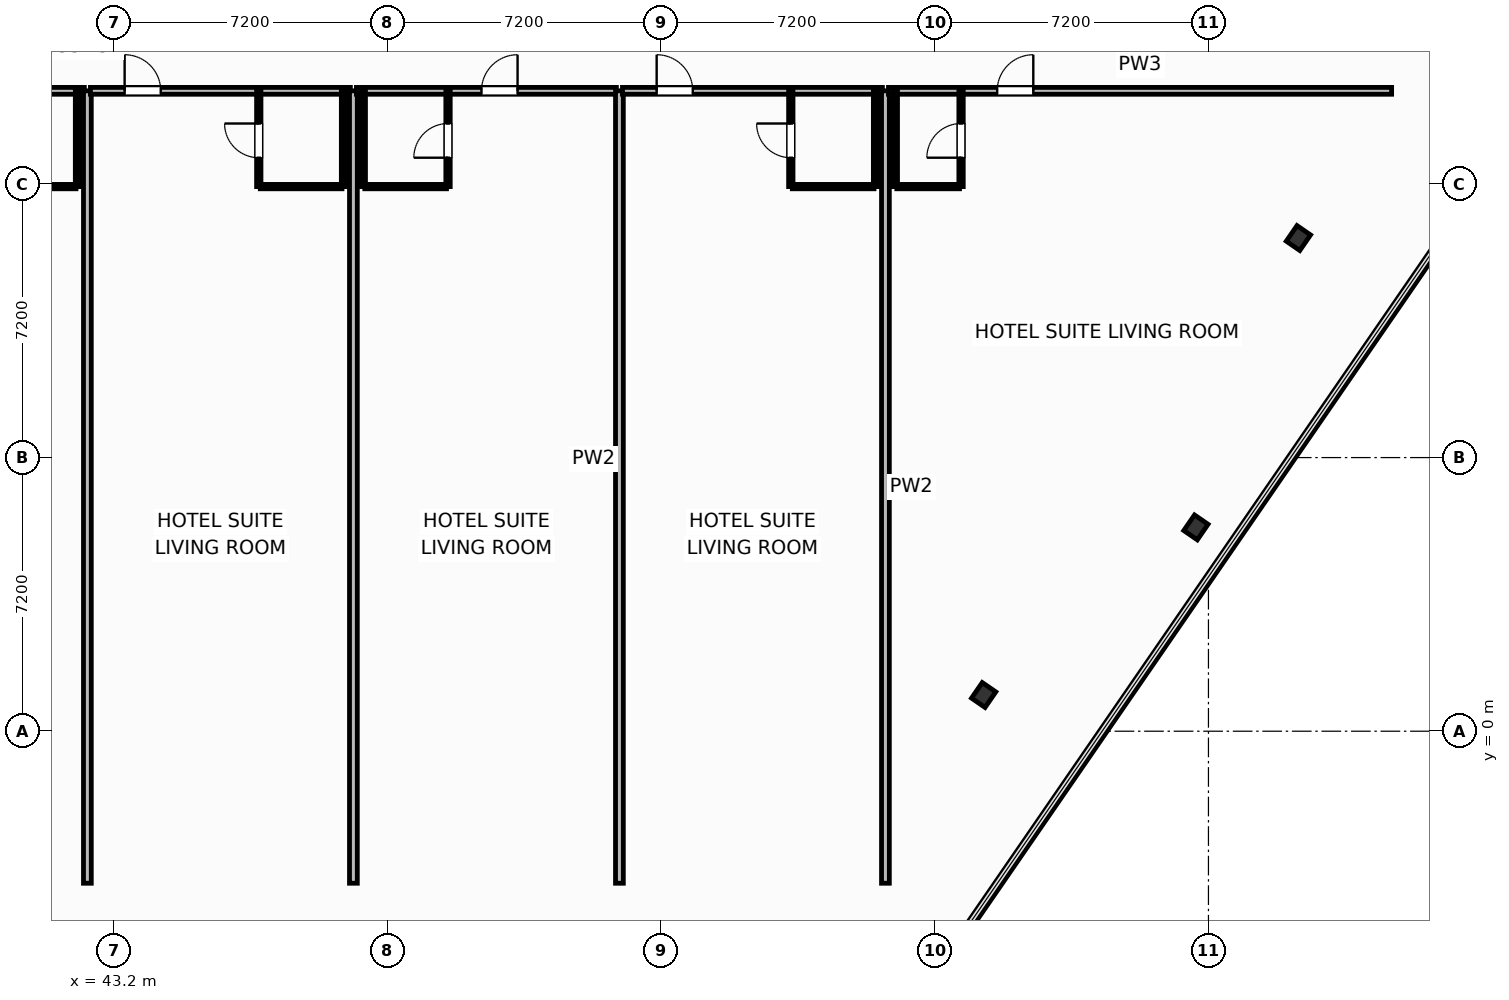
"""IFC4 building model, lengths in metres.
Left out: names, types, materials, properties, quantities, classifications, styles, units other than length and angle.
Written with IfcOpenShell. Run it as: python <this file> out.ifc"""

import sys

from ifc_helpers import new_model, si_unit, direction, frame, frame_2d, origin, origin_2d, place, context, subcontext, project, spatial, rectangle, i_section, extrude, element, fill, save


model = new_model("IFC4")
c1 = context("Model", 3, precision=1e-05, world=origin(), true_north=direction((0.0, 1.0)))
c2 = subcontext(c1, "Body", "Model", "MODEL_VIEW")
j1 = project(units=[si_unit("LENGTHUNIT", "METRE"), si_unit("PLANEANGLEUNIT", "RADIAN")], contexts=[c1])
p1 = place(None, origin())
s1 = spatial("IfcSite", under=j1, at=p1, CompositionType="ELEMENT")
p2 = place(p1, origin())
s2 = spatial("IfcBuilding", under=s1, at=p2, CompositionType="ELEMENT")
p3 = place(p2, frame((0.0, 0.0, 49.2)))
s3 = spatial("IfcBuildingStorey", under=s2, at=p3, CompositionType="ELEMENT", Elevation=49.2)
for number, where, z_axis, x_axis in (
    (1, (66.085, 0.953, 0.0), (0.0, 0.0, 1.0), (0.824, -0.567, 0.0)),
    (2, (71.67, 5.363, 0.0), (0.0, 0.0, 1.0), (0.824, -0.567, 0.0)),
    (3, (74.367, 12.976, 0.0), (0.0, 0.0, 1.0), (0.824, -0.567, 0.0)),
):
    element("IfcColumn", number, at=place(p3, frame(where, z_axis=z_axis, x_axis=x_axis)), inside=s3, PredefinedType="COLUMN", context=c2, shape_type="SweptSolid", body=[
        extrude(i_section(OverallWidth=0.432, OverallDepth=0.498, WebThickness=0.056, FlangeThickness=0.089, FilletRadius=0.025, at=origin_2d()), origin(), (0.0, 0.0, 1.0), 3.7),
    ])
p4 = place(p3, frame((33.518, -1.362, 0.0), z_axis=(0.0, 0.0, 1.0), x_axis=(0.82353935489, -0.567259139148, 0.0)))
e4 = element("IfcWall", 4, at=p4, inside=s3, PredefinedType="SOLIDWALL", context=c2, shape_type="SweptSolid", body=[
    extrude(rectangle(XDim=23.147, YDim=0.22, at=frame_2d((11.573, 0.0))), origin(), (0.0, 0.0, 1.0), 2.73),
])
p5 = place(p4, frame((10.749, 0.0, 0.8)))
e5 = element("IfcOpeningElement", 5, at=p5, cuts=e4, PredefinedType="OPENING", context=c2, shape_type="SweptSolid", body=[
    extrude(rectangle(XDim=1.65, YDim=1.65, at=frame_2d((0.825, 0.825))), frame((0.0, 0.12, 0.0), z_axis=(0.0, -1.0, 0.0), x_axis=(1.0, 0.0, 0.0)), (0.0, 0.0, 1.0), 0.24),
])
p6 = place(p3, frame((35.58, 16.85, 0.0), z_axis=(0.0, 0.0, 1.0), x_axis=(1.0, 0.0, 0.0)))
e6 = element("IfcWall", 6, at=p6, inside=s3, PredefinedType="PARTITIONING", context=c2, shape_type="SweptSolid", body=[
    extrude(rectangle(XDim=6.84, YDim=0.18, at=frame_2d((3.42, 0.0))), origin(), (0.0, 0.0, 1.0), 3.45),
])
p7 = place(p6, frame((0.9, 0.0, 0.0)))
e7 = element("IfcOpeningElement", 7, at=p7, cuts=e6, PredefinedType="OPENING", context=c2, shape_type="SweptSolid", body=[
    extrude(rectangle(XDim=0.95, YDim=2.15, at=frame_2d((0.475, 1.075))), frame((0.0, 0.1, 0.0), z_axis=(0.0, -1.0, 0.0), x_axis=(1.0, 0.0, 0.0)), (0.0, 0.0, 1.0), 0.2),
])
p8 = place(p3, frame((40.05, 14.33, 0.0), z_axis=(0.0, 0.0, 1.0), x_axis=(1.0, 0.0, 0.0)))
e8 = element("IfcWall", 8, at=p8, inside=s3, PredefinedType="PARTITIONING", context=c2, shape_type="SweptSolid", body=[
    extrude(rectangle(XDim=2.15, YDim=0.115, at=frame_2d((1.075, 0.0))), origin(), (0.0, 0.0, 1.0), 3.45),
])
p9 = place(p3, frame((42.24, 14.33, 0.0), z_axis=(0.0, 0.0, 1.0), x_axis=(0.0, 1.0, 0.0)))
e9 = element("IfcWall", 9, at=p9, inside=s3, PredefinedType="PARTITIONING", context=c2, shape_type="SweptSolid", body=[
    extrude(rectangle(XDim=2.52, YDim=0.115, at=frame_2d((1.26, 0.0))), origin(), (0.0, 0.0, 1.0), 3.45),
])
p10 = place(p3, frame((42.5, -4.0, 0.0), z_axis=(0.0, 0.0, 1.0), x_axis=(0.0, 1.0, 0.0)))
e10 = element("IfcWall", 10, at=p10, inside=s3, PredefinedType="PARTITIONING", context=c2, shape_type="SweptSolid", body=[
    extrude(rectangle(XDim=20.85, YDim=0.205, at=frame_2d((10.425, 0.0))), origin(), (0.0, 0.0, 1.0), 2.58),
])
p11 = place(p3, frame((42.58, 16.85, 0.0), z_axis=(0.0, 0.0, 1.0), x_axis=(1.0, 0.0, 0.0)))
e11 = element("IfcWall", 11, at=p11, inside=s3, PredefinedType="PARTITIONING", context=c2, shape_type="SweptSolid", body=[
    extrude(rectangle(XDim=6.84, YDim=0.18, at=frame_2d((3.42, 0.0))), origin(), (0.0, 0.0, 1.0), 3.45),
])
p12 = place(p11, frame((0.9, 0.0, 0.0)))
e12 = element("IfcOpeningElement", 12, at=p12, cuts=e11, PredefinedType="OPENING", context=c2, shape_type="SweptSolid", body=[
    extrude(rectangle(XDim=0.95, YDim=2.15, at=frame_2d((0.475, 1.075))), frame((0.0, 0.1, 0.0), z_axis=(0.0, -1.0, 0.0), x_axis=(1.0, 0.0, 0.0)), (0.0, 0.0, 1.0), 0.2),
])
p13 = place(p3, frame((47.05, 14.33, 0.0), z_axis=(0.0, 0.0, 1.0), x_axis=(1.0, 0.0, 0.0)))
e13 = element("IfcWall", 13, at=p13, inside=s3, PredefinedType="PARTITIONING", context=c2, shape_type="SweptSolid", body=[
    extrude(rectangle(XDim=2.15, YDim=0.115, at=frame_2d((1.075, 0.0))), origin(), (0.0, 0.0, 1.0), 3.45),
])
p14 = place(p3, frame((47.01, 14.33, 0.0), z_axis=(0.0, 0.0, 1.0), x_axis=(0.0, 1.0, 0.0)))
e14 = element("IfcWall", 14, at=p14, inside=s3, PredefinedType="PARTITIONING", context=c2, shape_type="SweptSolid", body=[
    extrude(rectangle(XDim=2.52, YDim=0.115, at=frame_2d((1.26, 0.0))), origin(), (0.0, 0.0, 1.0), 3.45),
])
p15 = place(p14, frame((0.76, 0.0, 0.0)))
e15 = element("IfcOpeningElement", 15, at=p15, cuts=e14, PredefinedType="OPENING", context=c2, shape_type="SweptSolid", body=[
    extrude(rectangle(XDim=0.9, YDim=2.05, at=frame_2d((0.45, 1.025))), frame((0.0, 0.067, 0.0), z_axis=(0.0, -1.0, 0.0), x_axis=(1.0, 0.0, 0.0)), (0.0, 0.0, 1.0), 0.135),
])
p16 = place(p3, frame((49.24, 14.33, 0.0), z_axis=(0.0, 0.0, 1.0), x_axis=(0.0, 1.0, 0.0)))
e16 = element("IfcWall", 16, at=p16, inside=s3, PredefinedType="PARTITIONING", context=c2, shape_type="SweptSolid", body=[
    extrude(rectangle(XDim=2.52, YDim=0.115, at=frame_2d((1.26, 0.0))), origin(), (0.0, 0.0, 1.0), 3.45),
])
p17 = place(p3, frame((49.5, -4.0, 0.0), z_axis=(0.0, 0.0, 1.0), x_axis=(0.0, 1.0, 0.0)))
e17 = element("IfcWall", 17, at=p17, inside=s3, PredefinedType="PARTITIONING", context=c2, shape_type="SweptSolid", body=[
    extrude(rectangle(XDim=20.85, YDim=0.205, at=frame_2d((10.425, 0.0))), origin(), (0.0, 0.0, 1.0), 3.45),
])
p18 = place(p3, frame((49.58, 16.85, 0.0), z_axis=(0.0, 0.0, 1.0), x_axis=(1.0, 0.0, 0.0)))
e18 = element("IfcWall", 18, at=p18, inside=s3, PredefinedType="PARTITIONING", context=c2, shape_type="SweptSolid", body=[
    extrude(rectangle(XDim=6.84, YDim=0.18, at=frame_2d((3.42, 0.0))), origin(), (0.0, 0.0, 1.0), 3.45),
])
p19 = place(p18, frame((3.29, 0.0, 0.0)))
e19 = element("IfcOpeningElement", 19, at=p19, cuts=e18, PredefinedType="OPENING", context=c2, shape_type="SweptSolid", body=[
    extrude(rectangle(XDim=0.95, YDim=2.15, at=frame_2d((0.475, 1.075))), frame((0.0, 0.1, 0.0), z_axis=(0.0, -1.0, 0.0), x_axis=(1.0, 0.0, 0.0)), (0.0, 0.0, 1.0), 0.2),
])
p20 = place(p3, frame((49.8, 14.33, 0.0), z_axis=(0.0, 0.0, 1.0), x_axis=(1.0, 0.0, 0.0)))
e20 = element("IfcWall", 20, at=p20, inside=s3, PredefinedType="PARTITIONING", context=c2, shape_type="SweptSolid", body=[
    extrude(rectangle(XDim=2.15, YDim=0.115, at=frame_2d((1.075, 0.0))), origin(), (0.0, 0.0, 1.0), 3.45),
])
p21 = place(p3, frame((51.99, 14.33, 0.0), z_axis=(0.0, 0.0, 1.0), x_axis=(0.0, 1.0, 0.0)))
e21 = element("IfcWall", 21, at=p21, inside=s3, PredefinedType="PARTITIONING", context=c2, shape_type="SweptSolid", body=[
    extrude(rectangle(XDim=2.52, YDim=0.115, at=frame_2d((1.26, 0.0))), origin(), (0.0, 0.0, 1.0), 3.45),
])
p22 = place(p21, frame((0.76, 0.0, 0.0)))
e22 = element("IfcOpeningElement", 22, at=p22, cuts=e21, PredefinedType="OPENING", context=c2, shape_type="SweptSolid", body=[
    extrude(rectangle(XDim=0.9, YDim=2.05, at=frame_2d((0.45, 1.025))), frame((0.0, 0.067, 0.0), z_axis=(0.0, -1.0, 0.0), x_axis=(1.0, 0.0, 0.0)), (0.0, 0.0, 1.0), 0.135),
])
p23 = place(p3, frame((49.76, 14.33, 0.0), z_axis=(0.0, 0.0, 1.0), x_axis=(0.0, 1.0, 0.0)))
e23 = element("IfcWall", 23, at=p23, inside=s3, PredefinedType="PARTITIONING", context=c2, shape_type="SweptSolid", body=[
    extrude(rectangle(XDim=2.52, YDim=0.115, at=frame_2d((1.26, 0.0))), origin(), (0.0, 0.0, 1.0), 3.45),
])
p24 = place(p3, frame((56.5, -4.0, 0.0), z_axis=(0.0, 0.0, 1.0), x_axis=(0.0, 1.0, 0.0)))
e24 = element("IfcWall", 24, at=p24, inside=s3, PredefinedType="PARTITIONING", context=c2, shape_type="SweptSolid", body=[
    extrude(rectangle(XDim=20.85, YDim=0.205, at=frame_2d((10.425, 0.0))), origin(), (0.0, 0.0, 1.0), 3.45),
])
p25 = place(p3, frame((56.58, 16.85, 0.0), z_axis=(0.0, 0.0, 1.0), x_axis=(1.0, 0.0, 0.0)))
e25 = element("IfcWall", 25, at=p25, inside=s3, PredefinedType="PARTITIONING", context=c2, shape_type="SweptSolid", body=[
    extrude(rectangle(XDim=6.84, YDim=0.18, at=frame_2d((3.42, 0.0))), origin(), (0.0, 0.0, 1.0), 2.58),
])
p26 = place(p25, frame((0.9, 0.0, 0.0)))
e26 = element("IfcOpeningElement", 26, at=p26, cuts=e25, PredefinedType="OPENING", context=c2, shape_type="SweptSolid", body=[
    extrude(rectangle(XDim=0.95, YDim=2.15, at=frame_2d((0.475, 1.075))), frame((0.0, 0.1, 0.0), z_axis=(0.0, -1.0, 0.0), x_axis=(1.0, 0.0, 0.0)), (0.0, 0.0, 1.0), 0.2),
])
p27 = place(p3, frame((61.05, 14.33, 0.0), z_axis=(0.0, 0.0, 1.0), x_axis=(1.0, 0.0, 0.0)))
e27 = element("IfcWall", 27, at=p27, inside=s3, PredefinedType="PARTITIONING", context=c2, shape_type="SweptSolid", body=[
    extrude(rectangle(XDim=2.15, YDim=0.115, at=frame_2d((1.075, 0.0))), origin(), (0.0, 0.0, 1.0), 3.45),
])
p28 = place(p3, frame((61.01, 14.33, 0.0), z_axis=(0.0, 0.0, 1.0), x_axis=(0.0, 1.0, 0.0)))
e28 = element("IfcWall", 28, at=p28, inside=s3, PredefinedType="PARTITIONING", context=c2, shape_type="SweptSolid", body=[
    extrude(rectangle(XDim=2.52, YDim=0.115, at=frame_2d((1.26, 0.0))), origin(), (0.0, 0.0, 1.0), 3.45),
])
p29 = place(p28, frame((0.76, 0.0, 0.0)))
e29 = element("IfcOpeningElement", 29, at=p29, cuts=e28, PredefinedType="OPENING", context=c2, shape_type="SweptSolid", body=[
    extrude(rectangle(XDim=0.9, YDim=2.05, at=frame_2d((0.45, 1.025))), frame((0.0, 0.067, 0.0), z_axis=(0.0, -1.0, 0.0), x_axis=(1.0, 0.0, 0.0)), (0.0, 0.0, 1.0), 0.135),
])
p30 = place(p3, frame((63.24, 14.33, 0.0), z_axis=(0.0, 0.0, 1.0), x_axis=(0.0, 1.0, 0.0)))
e30 = element("IfcWall", 30, at=p30, inside=s3, PredefinedType="PARTITIONING", context=c2, shape_type="SweptSolid", body=[
    extrude(rectangle(XDim=2.52, YDim=0.115, at=frame_2d((1.26, 0.0))), origin(), (0.0, 0.0, 1.0), 3.45),
])
p31 = place(p3, frame((63.5, -4.0, 0.0), z_axis=(0.0, 0.0, 1.0), x_axis=(0.0, 1.0, 0.0)))
e31 = element("IfcWall", 31, at=p31, inside=s3, PredefinedType="PARTITIONING", context=c2, shape_type="SweptSolid", body=[
    extrude(rectangle(XDim=20.85, YDim=0.205, at=frame_2d((10.425, 0.0))), origin(), (0.0, 0.0, 1.0), 3.45),
])
p32 = place(p3, frame((63.58, 16.85, 0.0), z_axis=(0.0, 0.0, 1.0), x_axis=(1.0, 0.0, 0.0)))
e32 = element("IfcWall", 32, at=p32, inside=s3, PredefinedType="PARTITIONING", context=c2, shape_type="SweptSolid", body=[
    extrude(rectangle(XDim=13.24, YDim=0.18, at=frame_2d((6.62, 0.0))), origin(), (0.0, 0.0, 1.0), 3.45),
])
p33 = place(p32, frame((2.861, 0.0, 0.0)))
e33 = element("IfcOpeningElement", 33, at=p33, cuts=e32, PredefinedType="OPENING", context=c2, shape_type="SweptSolid", body=[
    extrude(rectangle(XDim=0.95, YDim=2.15, at=frame_2d((0.475, 1.075))), frame((0.0, 0.1, 0.0), z_axis=(0.0, -1.0, 0.0), x_axis=(1.0, 0.0, 0.0)), (0.0, 0.0, 1.0), 0.2),
])
p34 = place(p3, frame((63.8, 14.33, 0.0), z_axis=(0.0, 0.0, 1.0), x_axis=(1.0, 0.0, 0.0)))
e34 = element("IfcWall", 34, at=p34, inside=s3, PredefinedType="PARTITIONING", context=c2, shape_type="SweptSolid", body=[
    extrude(rectangle(XDim=1.65, YDim=0.115, at=frame_2d((0.825, 0.0))), origin(), (0.0, 0.0, 1.0), 3.45),
])
p35 = place(p3, frame((65.49, 14.33, 0.0), z_axis=(0.0, 0.0, 1.0), x_axis=(0.0, 1.0, 0.0)))
e35 = element("IfcWall", 35, at=p35, inside=s3, PredefinedType="PARTITIONING", context=c2, shape_type="SweptSolid", body=[
    extrude(rectangle(XDim=2.52, YDim=0.115, at=frame_2d((1.26, 0.0))), origin(), (0.0, 0.0, 1.0), 3.45),
])
p36 = place(p35, frame((0.76, 0.0, 0.0)))
e36 = element("IfcOpeningElement", 36, at=p36, cuts=e35, PredefinedType="OPENING", context=c2, shape_type="SweptSolid", body=[
    extrude(rectangle(XDim=0.9, YDim=2.05, at=frame_2d((0.45, 1.025))), frame((0.0, 0.067, 0.0), z_axis=(0.0, -1.0, 0.0), x_axis=(1.0, 0.0, 0.0)), (0.0, 0.0, 1.0), 0.135),
])
p37 = place(p3, frame((63.76, 14.33, 0.0), z_axis=(0.0, 0.0, 1.0), x_axis=(0.0, 1.0, 0.0)))
e37 = element("IfcWall", 37, at=p37, inside=s3, PredefinedType="PARTITIONING", context=c2, shape_type="SweptSolid", body=[
    extrude(rectangle(XDim=2.52, YDim=0.115, at=frame_2d((1.26, 0.0))), origin(), (0.0, 0.0, 1.0), 3.45),
])
p38 = place(p12, origin())
e38 = element("IfcDoor", 38, at=p38, inside=s3, OperationType="SINGLE_SWING_LEFT", PredefinedType="DOOR", context=c2, shape_type="SweptSolid", body=[
    extrude(rectangle(XDim=0.95, YDim=2.15, at=frame_2d((0.475, 1.075))), frame((0.0, 0.025, 0.0), z_axis=(0.0, -1.0, 0.0), x_axis=(1.0, 0.0, 0.0)), (0.0, 0.0, 1.0), 0.05),
])
fill(e12, e38)
p39 = place(p15, origin())
e39 = element("IfcDoor", 39, at=p39, inside=s3, OperationType="SINGLE_SWING_RIGHT", PredefinedType="DOOR", context=c2, shape_type="SweptSolid", body=[
    extrude(rectangle(XDim=0.9, YDim=2.05, at=frame_2d((0.45, 1.025))), frame((0.0, 0.025, 0.0), z_axis=(0.0, -1.0, 0.0), x_axis=(1.0, 0.0, 0.0)), (0.0, 0.0, 1.0), 0.05),
])
fill(e15, e39)
p40 = place(p19, origin())
e40 = element("IfcDoor", 40, at=p40, inside=s3, OperationType="SINGLE_SWING_RIGHT", PredefinedType="DOOR", context=c2, shape_type="SweptSolid", body=[
    extrude(rectangle(XDim=0.95, YDim=2.15, at=frame_2d((0.475, 1.075))), frame((0.0, 0.025, 0.0), z_axis=(0.0, -1.0, 0.0), x_axis=(1.0, 0.0, 0.0)), (0.0, 0.0, 1.0), 0.05),
])
fill(e19, e40)
p41 = place(p22, origin())
e41 = element("IfcDoor", 41, at=p41, inside=s3, OperationType="SINGLE_SWING_LEFT", PredefinedType="DOOR", context=c2, shape_type="SweptSolid", body=[
    extrude(rectangle(XDim=0.9, YDim=2.05, at=frame_2d((0.45, 1.025))), frame((0.0, 0.025, 0.0), z_axis=(0.0, -1.0, 0.0), x_axis=(1.0, 0.0, 0.0)), (0.0, 0.0, 1.0), 0.05),
])
fill(e22, e41)
p42 = place(p26, origin())
e42 = element("IfcDoor", 42, at=p42, inside=s3, OperationType="SINGLE_SWING_LEFT", PredefinedType="DOOR", context=c2, shape_type="SweptSolid", body=[
    extrude(rectangle(XDim=0.95, YDim=2.15, at=frame_2d((0.475, 1.075))), frame((0.0, 0.025, 0.0), z_axis=(0.0, -1.0, 0.0), x_axis=(1.0, 0.0, 0.0)), (0.0, 0.0, 1.0), 0.05),
])
fill(e26, e42)
p43 = place(p29, origin())
e43 = element("IfcDoor", 43, at=p43, inside=s3, OperationType="SINGLE_SWING_RIGHT", PredefinedType="DOOR", context=c2, shape_type="SweptSolid", body=[
    extrude(rectangle(XDim=0.9, YDim=2.05, at=frame_2d((0.45, 1.025))), frame((0.0, 0.025, 0.0), z_axis=(0.0, -1.0, 0.0), x_axis=(1.0, 0.0, 0.0)), (0.0, 0.0, 1.0), 0.05),
])
fill(e29, e43)
p44 = place(p33, origin())
e44 = element("IfcDoor", 44, at=p44, inside=s3, OperationType="SINGLE_SWING_RIGHT", PredefinedType="DOOR", context=c2, shape_type="SweptSolid", body=[
    extrude(rectangle(XDim=0.95, YDim=2.15, at=frame_2d((0.475, 1.075))), frame((0.0, 0.025, 0.0), z_axis=(0.0, -1.0, 0.0), x_axis=(1.0, 0.0, 0.0)), (0.0, 0.0, 1.0), 0.05),
])
fill(e33, e44)
p45 = place(p36, origin())
e45 = element("IfcDoor", 45, at=p45, inside=s3, OperationType="SINGLE_SWING_LEFT", PredefinedType="DOOR", context=c2, shape_type="SweptSolid", body=[
    extrude(rectangle(XDim=0.9, YDim=2.05, at=frame_2d((0.45, 1.025))), frame((0.0, 0.025, 0.0), z_axis=(0.0, -1.0, 0.0), x_axis=(1.0, 0.0, 0.0)), (0.0, 0.0, 1.0), 0.05),
])
fill(e36, e45)
save(model, sys.argv[1])
